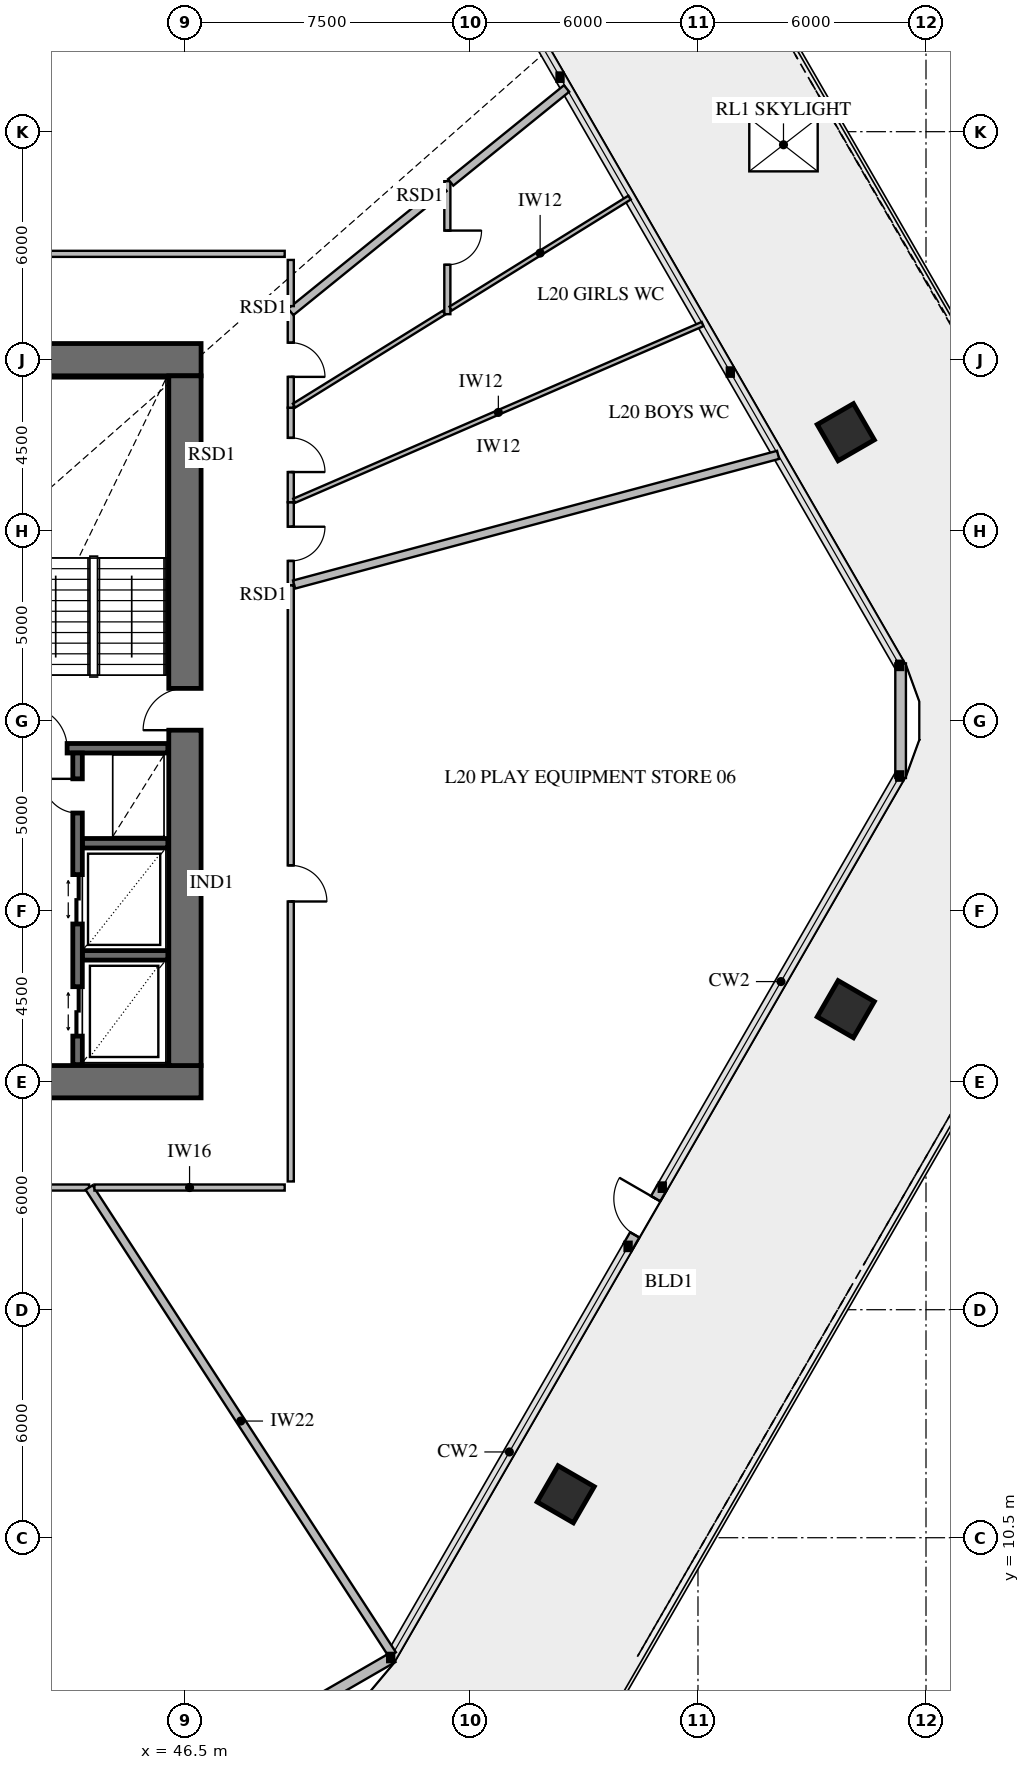
"""IFC4 building model, lengths in metres.
Left out: names, types, materials, properties, quantities, classifications, styles, units other than length and angle.
Written with IfcOpenShell. Run it as: python <this file> out.ifc"""

import sys

from ifc_helpers import new_model, si_unit, direction, frame, frame_2d, origin, origin_2d, place, context, subcontext, project, spatial, rectangle, extrude, element, fill, save


model = new_model("IFC4")
c1 = context("Model", 3, precision=1e-05, world=origin(), true_north=direction((0.0, 1.0)))
c2 = subcontext(c1, "Body", "Model", "MODEL_VIEW")
j1 = project(units=[si_unit("LENGTHUNIT", "METRE"), si_unit("PLANEANGLEUNIT", "RADIAN")], contexts=[c1])
p1 = place(None, origin())
s1 = spatial("IfcSite", under=j1, at=p1, CompositionType="ELEMENT")
p2 = place(p1, origin())
s2 = spatial("IfcBuilding", under=s1, at=p2, CompositionType="ELEMENT")
p3 = place(p2, frame((0.0, 0.0, 83.4)))
s3 = spatial("IfcBuildingStorey", under=s2, at=p3, CompositionType="ELEMENT", Elevation=83.4)
p4 = place(p3, frame((37.35, 22.5, 0.0), z_axis=(0.0, 0.0, 1.0), x_axis=(1.0, 0.0, 0.0)))
e1 = element("IfcWall", 1, at=p4, inside=s3, PredefinedType="SHEAR", context=c2, shape_type="SweptSolid", body=[
    extrude(rectangle(XDim=9.575, YDim=0.85, at=frame_2d((4.788, 0.0))), origin(), (0.0, 0.0, 1.0), 4.2),
])
p5 = place(p4, frame((3.95, 0.0, 0.0)))
e2 = element("IfcOpeningElement", 2, at=p5, cuts=e1, PredefinedType="OPENING", context=c2, shape_type="SweptSolid", body=[
    extrude(rectangle(XDim=1.5, YDim=2.15, at=frame_2d((0.75, 1.075))), frame((0.0, 0.437, 0.0), z_axis=(0.0, -1.0, 0.0), x_axis=(1.0, 0.0, 0.0)), (0.0, 0.0, 1.0), 0.874),
])
p6 = place(p3, frame((46.925, 41.5, 0.0), z_axis=(0.0, 0.0, 1.0), x_axis=(-1.0, 0.0, 0.0)))
e3 = element("IfcWall", 3, at=p6, inside=s3, PredefinedType="SHEAR", context=c2, shape_type="SweptSolid", body=[
    extrude(rectangle(XDim=7.975, YDim=0.85, at=frame_2d((3.988, 0.0))), origin(), (0.0, 0.0, 1.0), 4.2),
])
p7 = place(p3, frame((46.5, 22.925, 0.0), z_axis=(0.0, 0.0, 1.0), x_axis=(0.0, 1.0, 0.0)))
e4 = element("IfcWall", 4, at=p7, inside=s3, PredefinedType="SHEAR", context=c2, shape_type="SweptSolid", body=[
    extrude(rectangle(XDim=18.15, YDim=0.85, at=frame_2d((9.075, 0.0))), origin(), (0.0, 0.0, 1.0), 4.2),
])
p8 = place(p7, frame((8.825, 0.0, 0.0)))
e5 = element("IfcOpeningElement", 5, at=p8, cuts=e4, PredefinedType="OPENING", context=c2, shape_type="SweptSolid", body=[
    extrude(rectangle(XDim=1.1, YDim=2.15, at=frame_2d((0.55, 1.075))), frame((0.0, 0.437, 0.0), z_axis=(0.0, -1.0, 0.0), x_axis=(1.0, 0.0, 0.0)), (0.0, 0.0, 1.0), 0.874),
])
for number, where, z_axis, x_axis in (
    (6, (63.889, 39.592, 0.0), (0.0, 0.0, 1.0), (-0.5, 0.866, 0.0)),
    (7, (56.519, 11.643, 0.0), (0.0, 0.0, 1.0), (0.5, 0.866, 0.0)),
    (8, (63.889, 24.408, 0.0), (0.0, 0.0, 1.0), (0.5, 0.866, 0.0)),
):
    element("IfcColumn", number, at=place(p3, frame(where, z_axis=z_axis, x_axis=x_axis)), inside=s3, PredefinedType="COLUMN", context=c2, shape_type="SweptSolid", body=[
        extrude(rectangle(XDim=1.1, YDim=1.1, at=origin_2d()), origin(), (0.0, 0.0, 1.0), 3.85),
    ])
p9 = place(p3, frame((59.058, 19.721, 0.0), z_axis=(0.0, 0.0, 1.0), x_axis=(-0.499982180423, -0.866035691677, 0.0)))
e9 = element("IfcWall", 9, at=p9, inside=s3, PredefinedType="SOLIDWALL", context=c2, shape_type="SweptSolid", body=[
    extrude(rectangle(XDim=1.79, YDim=0.28, at=frame_2d((0.895, 0.0))), origin(), (0.0, 0.0, 1.0), 3.85),
])
p10 = place(p9, frame((0.345, 0.0, 0.0)))
e10 = element("IfcOpeningElement", 10, at=p10, cuts=e9, PredefinedType="OPENING", context=c2, shape_type="SweptSolid", body=[
    extrude(rectangle(XDim=1.1, YDim=2.2, at=frame_2d((0.55, 1.1))), frame((0.0, 0.152, 0.0), z_axis=(0.0, -1.0, 0.0), x_axis=(1.0, 0.0, 0.0)), (0.0, 0.0, 1.0), 0.304),
])
for number, where, z_axis, x_axis in (
    (11, (51.971, 7.352, 0.0), (0.0, 0.0, 1.0), (-0.866, -0.5, 0.0)),
    (12, (65.332, 33.508, 0.0), (0.0, 0.0, 1.0), (0.0, -1.0, 0.0)),
):
    element("IfcWall", number, at=place(p3, frame(where, z_axis=z_axis, x_axis=x_axis)), inside=s3, PredefinedType="SOLIDWALL", context=c2, shape_type="SweptSolid", body=[
        extrude(rectangle(XDim=3.015, YDim=0.28, at=frame_2d((1.508, 0.0))), origin(), (0.0, 0.0, 1.0), 3.85),
    ])
p11 = place(p3, frame((25.95, 31.275, 0.0), z_axis=(0.0, 0.0, 1.0), x_axis=(1.0, 0.0, 0.0)))
e13 = element("IfcWall", 13, at=p11, inside=s3, PredefinedType="SOLIDWALL", context=c2, shape_type="SweptSolid", body=[
    extrude(rectangle(XDim=20.1, YDim=0.25, at=frame_2d((10.05, 0.0))), origin(), (0.0, 0.0, 1.0), 4.2),
])
p12 = place(p11, frame((2.6, 0.0, 0.0)))
e14 = element("IfcOpeningElement", 14, at=p12, cuts=e13, PredefinedType="OPENING", context=c2, shape_type="SweptSolid", body=[
    extrude(rectangle(XDim=1.1, YDim=2.15, at=frame_2d((0.55, 1.075))), frame((0.0, 0.137, 0.0), z_axis=(0.0, -1.0, 0.0), x_axis=(1.0, 0.0, 0.0)), (0.0, 0.0, 1.0), 0.274),
])
p13 = place(p11, frame((10.6, 0.0, 0.0)))
e15 = element("IfcOpeningElement", 15, at=p13, cuts=e13, PredefinedType="OPENING", context=c2, shape_type="SweptSolid", body=[
    extrude(rectangle(XDim=1.1, YDim=2.15, at=frame_2d((0.55, 1.075))), frame((0.0, 0.137, 0.0), z_axis=(0.0, -1.0, 0.0), x_axis=(1.0, 0.0, 0.0)), (0.0, 0.0, 1.0), 0.274),
])
p14 = place(p11, frame((16.35, 0.0, 0.0)))
e16 = element("IfcOpeningElement", 16, at=p14, cuts=e13, PredefinedType="OPENING", context=c2, shape_type="SweptSolid", body=[
    extrude(rectangle(XDim=1.1, YDim=2.15, at=frame_2d((0.55, 1.075))), frame((0.0, 0.137, 0.0), z_axis=(0.0, -1.0, 0.0), x_axis=(1.0, 0.0, 0.0)), (0.0, 0.0, 1.0), 0.274),
])
for number, where, z_axis, x_axis in (
    (17, (43.8, 25.825, 0.0), (0.0, 0.0, 1.0), (1.0, 0.0, 0.0)),
    (18, (43.8, 28.775, 0.0), (0.0, 0.0, 1.0), (1.0, 0.0, 0.0)),
):
    element("IfcWall", number, at=place(p3, frame(where, z_axis=z_axis, x_axis=x_axis)), inside=s3, PredefinedType="SOLIDWALL", context=c2, shape_type="SweptSolid", body=[
        extrude(rectangle(XDim=2.25, YDim=0.25, at=frame_2d((1.125, 0.0))), origin(), (0.0, 0.0, 1.0), 4.2),
    ])
p15 = place(p3, frame((43.675, 22.95, 0.0), z_axis=(0.0, 0.0, 1.0), x_axis=(0.0, 1.0, 0.0)))
e19 = element("IfcWall", 19, at=p15, inside=s3, PredefinedType="SOLIDWALL", context=c2, shape_type="SweptSolid", body=[
    extrude(rectangle(XDim=8.2, YDim=0.25, at=frame_2d((4.1, 0.0))), origin(), (0.0, 0.0, 1.0), 4.2),
])
p16 = place(p15, frame((0.75, 0.0, 0.0)))
e20 = element("IfcOpeningElement", 20, at=p16, cuts=e19, PredefinedType="OPENING", context=c2, shape_type="SweptSolid", body=[
    extrude(rectangle(XDim=1.3, YDim=2.3, at=frame_2d((0.65, 1.15))), frame((0.0, 0.137, 0.0), z_axis=(0.0, -1.0, 0.0), x_axis=(1.0, 0.0, 0.0)), (0.0, 0.0, 1.0), 0.274),
])
p17 = place(p15, frame((3.7, 0.0, 0.0)))
e21 = element("IfcOpeningElement", 21, at=p17, cuts=e19, PredefinedType="OPENING", context=c2, shape_type="SweptSolid", body=[
    extrude(rectangle(XDim=1.3, YDim=2.3, at=frame_2d((0.65, 1.15))), frame((0.0, 0.137, 0.0), z_axis=(0.0, -1.0, 0.0), x_axis=(1.0, 0.0, 0.0)), (0.0, 0.0, 1.0), 0.274),
])
p18 = place(p15, frame((6.62, 0.0, 0.0)))
e22 = element("IfcOpeningElement", 22, at=p18, cuts=e19, PredefinedType="OPENING", context=c2, shape_type="SweptSolid", body=[
    extrude(rectangle(XDim=0.9, YDim=2.1, at=frame_2d((0.45, 1.05))), frame((0.0, 0.137, 0.0), z_axis=(0.0, -1.0, 0.0), x_axis=(1.0, 0.0, 0.0)), (0.0, 0.0, 1.0), 0.274),
])
p19 = place(p3, frame((49.285, 35.56, 0.0), z_axis=(0.0, 0.0, 1.0), x_axis=(0.0, 1.0, 0.0)))
e23 = element("IfcWall", 23, at=p19, inside=s3, PredefinedType="PARTITIONING", context=c2, shape_type="SweptSolid", body=[
    extrude(rectangle(XDim=2.189, YDim=0.16, at=frame_2d((1.094, 0.0))), origin(), (0.0, 0.0, 1.0), 3.15),
])
p20 = place(p19, frame((0.645, 0.0, 0.0)))
e24 = element("IfcOpeningElement", 24, at=p20, cuts=e23, PredefinedType="OPENING", context=c2, shape_type="SweptSolid", body=[
    extrude(rectangle(XDim=0.9, YDim=2.1, at=frame_2d((0.45, 1.05))), frame((0.0, 0.092, 0.0), z_axis=(0.0, -1.0, 0.0), x_axis=(1.0, 0.0, 0.0)), (0.0, 0.0, 1.0), 0.184),
])
p21 = place(p3, frame((49.285, 37.749, 0.0), z_axis=(0.0, 0.0, 1.0), x_axis=(0.0, 1.0, 0.0)))
e25 = element("IfcWall", 25, at=p21, inside=s3, PredefinedType="PARTITIONING", context=c2, shape_type="SweptSolid", body=[
    extrude(rectangle(XDim=2.488, YDim=0.16, at=frame_2d((1.244, 0.0))), origin(), (0.0, 0.0, 1.0), 3.85),
])
p22 = place(p21, frame((0.794, 0.0, 0.0)))
e26 = element("IfcOpeningElement", 26, at=p22, cuts=e25, PredefinedType="OPENING", context=c2, shape_type="SweptSolid", body=[
    extrude(rectangle(XDim=0.9, YDim=2.1, at=frame_2d((0.45, 1.05))), frame((0.0, 0.092, 0.0), z_axis=(0.0, -1.0, 0.0), x_axis=(1.0, 0.0, 0.0)), (0.0, 0.0, 1.0), 0.184),
])
p23 = place(p3, frame((53.405, 46.197, 0.0), z_axis=(0.0, 0.0, 1.0), x_axis=(0.0, -1.0, 0.0)))
e27 = element("IfcWall", 27, at=p23, inside=s3, PredefinedType="PARTITIONING", context=c2, shape_type="SweptSolid", body=[
    extrude(rectangle(XDim=3.5, YDim=0.16, at=frame_2d((1.75, 0.0))), origin(), (0.0, 0.0, 1.0), 3.4),
])
p24 = place(p23, frame((1.3, 0.0, 0.0)))
e28 = element("IfcOpeningElement", 28, at=p24, cuts=e27, PredefinedType="OPENING", context=c2, shape_type="SweptSolid", body=[
    extrude(rectangle(XDim=0.9, YDim=2.1, at=frame_2d((0.45, 1.05))), frame((0.0, 0.092, 0.0), z_axis=(0.0, -1.0, 0.0), x_axis=(1.0, 0.0, 0.0)), (0.0, 0.0, 1.0), 0.184),
])
p25 = place(p3, frame((49.285, 40.237, 0.0), z_axis=(0.0, 0.0, 1.0), x_axis=(0.0, 1.0, 0.0)))
e29 = element("IfcWall", 29, at=p25, inside=s3, PredefinedType="PARTITIONING", context=c2, shape_type="SweptSolid", body=[
    extrude(rectangle(XDim=2.521, YDim=0.16, at=frame_2d((1.26, 0.0))), origin(), (0.0, 0.0, 1.0), 3.85),
])
p26 = place(p25, frame((0.811, 0.0, 0.0)))
e30 = element("IfcOpeningElement", 30, at=p26, cuts=e29, PredefinedType="OPENING", context=c2, shape_type="SweptSolid", body=[
    extrude(rectangle(XDim=0.9, YDim=2.1, at=frame_2d((0.45, 1.05))), frame((0.0, 0.092, 0.0), z_axis=(0.0, -1.0, 0.0), x_axis=(1.0, 0.0, 0.0)), (0.0, 0.0, 1.0), 0.184),
])
p27 = place(p3, frame((49.125, 44.285, 0.0), z_axis=(0.0, 0.0, 1.0), x_axis=(-1.0, 0.0, 0.0)))
e31 = element("IfcWall", 31, at=p27, inside=s3, PredefinedType="PARTITIONING", context=c2, shape_type="SweptSolid", body=[
    extrude(rectangle(XDim=17.841, YDim=0.16, at=frame_2d((8.92, 0.0))), origin(), (0.0, 0.0, 1.0), 3.15),
])
p28 = place(p27, frame((8.17, 0.0, 0.0)))
e32 = element("IfcOpeningElement", 32, at=p28, cuts=e31, PredefinedType="OPENING", context=c2, shape_type="SweptSolid", body=[
    extrude(rectangle(XDim=1.5, YDim=2.15, at=frame_2d((0.75, 1.075))), frame((0.0, 0.092, 0.0), z_axis=(0.0, -1.0, 0.0), x_axis=(1.0, 0.0, 0.0)), (0.0, 0.0, 1.0), 0.184),
])
p29 = place(p3, frame((26.052, 19.715, 0.0), z_axis=(0.0, 0.0, 1.0), x_axis=(1.0, 0.0, 0.0)))
e33 = element("IfcWall", 33, at=p29, inside=s3, PredefinedType="PARTITIONING", context=c2, shape_type="SweptSolid", body=[
    extrude(rectangle(XDim=17.926, YDim=0.16, at=frame_2d((8.963, 0.0))), origin(), (0.0, 0.0, 1.0), 3.15),
])
p30 = place(p29, frame((8.488, 0.0, 0.0)))
e34 = element("IfcOpeningElement", 34, at=p30, cuts=e33, PredefinedType="OPENING", context=c2, shape_type="SweptSolid", body=[
    extrude(rectangle(XDim=0.95, YDim=2.1, at=frame_2d((0.475, 1.05))), frame((0.0, 0.092, 0.0), z_axis=(0.0, -1.0, 0.0), x_axis=(1.0, 0.0, 0.0)), (0.0, 0.0, 1.0), 0.184),
])
p31 = place(p3, frame((49.285, 19.875, 0.0), z_axis=(0.0, 0.0, 1.0), x_axis=(0.0, 1.0, 0.0)))
e35 = element("IfcWall", 35, at=p31, inside=s3, PredefinedType="PARTITIONING", context=c2, shape_type="SweptSolid", body=[
    extrude(rectangle(XDim=15.685, YDim=0.16, at=frame_2d((7.842, 0.0))), origin(), (0.0, 0.0, 1.0), 3.15),
])
p32 = place(p31, frame((7.367, 0.0, 0.0)))
e36 = element("IfcOpeningElement", 36, at=p32, cuts=e35, PredefinedType="OPENING", context=c2, shape_type="SweptSolid", body=[
    extrude(rectangle(XDim=0.95, YDim=2.1, at=frame_2d((0.475, 1.05))), frame((0.0, 0.092, 0.0), z_axis=(0.0, -1.0, 0.0), x_axis=(1.0, 0.0, 0.0)), (0.0, 0.0, 1.0), 0.184),
])
p33 = place(p3, frame((49.373, 35.583, 0.0), z_axis=(0.0, 0.0, 1.0), x_axis=(0.965927222809, 0.258813833165, 0.0)))
e37 = element("IfcWall", 37, at=p33, inside=s3, PredefinedType="PARTITIONING", context=c2, shape_type="SweptSolid", body=[
    extrude(rectangle(XDim=13.185, YDim=0.22, at=frame_2d((6.592, 0.0))), origin(), (0.0, 0.0, 1.0), 3.15),
])
p34 = place(p3, frame((49.373, 37.787, 0.0), z_axis=(0.0, 0.0, 1.0), x_axis=(0.917761357583, 0.397132333772, 0.0)))
e38 = element("IfcWall", 38, at=p34, inside=s3, PredefinedType="PARTITIONING", context=c2, shape_type="SweptSolid", body=[
    extrude(rectangle(XDim=11.711, YDim=0.12, at=frame_2d((5.855, 0.0))), origin(), (0.0, 0.0, 1.0), 3.4),
])
p35 = place(p3, frame((49.373, 40.292, 0.0), z_axis=(0.0, 0.0, 1.0), x_axis=(0.849866876435, 0.526997431054, 0.0)))
e39 = element("IfcWall", 39, at=p35, inside=s3, PredefinedType="PARTITIONING", context=c2, shape_type="SweptSolid", body=[
    extrude(rectangle(XDim=4.641, YDim=0.12, at=frame_2d((2.32, 0.0))), origin(), (0.0, 0.0, 1.0), 3.85),
])
p36 = place(p3, frame((53.493, 42.846, 0.0), z_axis=(0.0, 0.0, 1.0), x_axis=(0.849887293627, 0.526964503673, 0.0)))
e40 = element("IfcWall", 40, at=p36, inside=s3, PredefinedType="PARTITIONING", context=c2, shape_type="SweptSolid", body=[
    extrude(rectangle(XDim=5.539, YDim=0.12, at=frame_2d((2.77, 0.0))), origin(), (0.0, 0.0, 1.0), 3.4),
])
p37 = place(p3, frame((49.285, 42.758, 0.0), z_axis=(0.0, 0.0, 1.0), x_axis=(0.777159385962, 0.629303812805, 0.0)))
e41 = element("IfcWall", 41, at=p37, inside=s3, PredefinedType="PARTITIONING", context=c2, shape_type="SweptSolid", body=[
    extrude(rectangle(XDim=5.188, YDim=0.22, at=frame_2d((2.594, 0.0))), origin(), (0.0, 0.0, 1.0), 3.4),
])
p38 = place(p3, frame((53.493, 46.166, 0.0), z_axis=(0.0, 0.0, 1.0), x_axis=(0.77713476339, 0.62933421926, 0.0)))
e42 = element("IfcWall", 42, at=p38, inside=s3, PredefinedType="PARTITIONING", context=c2, shape_type="SweptSolid", body=[
    extrude(rectangle(XDim=3.925, YDim=0.22, at=frame_2d((1.962, 0.0))), origin(), (0.0, 0.0, 1.0), 3.85),
])
p39 = place(p3, frame((49.285, 42.91, 0.0), z_axis=(0.0, 0.0, 1.0), x_axis=(0.0, 1.0, 0.0)))
e43 = element("IfcWall", 43, at=p39, inside=s3, PredefinedType="PARTITIONING", context=c2, shape_type="SweptSolid", body=[
    extrude(rectangle(XDim=1.215, YDim=0.16, at=frame_2d((0.607, 0.0))), origin(), (0.0, 0.0, 1.0), 3.85),
])
p40 = place(p3, frame((43.978, 19.715, 0.0), z_axis=(0.0, 0.0, 1.0), x_axis=(0.54462522792, -0.838679534216, 0.0)))
e44 = element("IfcWall", 44, at=p40, inside=s3, PredefinedType="PARTITIONING", context=c2, shape_type="SweptSolid", body=[
    extrude(rectangle(XDim=14.654, YDim=0.22, at=frame_2d((7.327, 0.0))), origin(), (0.0, 0.0, 1.0), 3.1),
])
p41 = place(p3, frame((44.119, 19.715, 0.0), z_axis=(0.0, 0.0, 1.0), x_axis=(1.0, 0.0, 0.0)))
e45 = element("IfcWall", 45, at=p41, inside=s3, PredefinedType="PARTITIONING", context=c2, shape_type="SweptSolid", body=[
    extrude(rectangle(XDim=5.006, YDim=0.16, at=frame_2d((2.503, 0.0))), origin(), (0.0, 0.0, 1.0), 3.15),
])
p42 = place(p10, frame((1.1, 0.0, 0.0), z_axis=(0.0, 0.0, 1.0), x_axis=(-1.0, 0.0, 0.0)))
e46 = element("IfcDoor", 46, at=p42, inside=s3, OperationType="SINGLE_SWING_RIGHT", PredefinedType="DOOR", context=c2, shape_type="SweptSolid", body=[
    extrude(rectangle(XDim=1.1, YDim=2.2, at=frame_2d((0.55, 1.1))), frame((0.0, 0.025, 0.0), z_axis=(0.0, -1.0, 0.0), x_axis=(1.0, 0.0, 0.0)), (0.0, 0.0, 1.0), 0.05),
])
fill(e10, e46)
p43 = place(p3, frame((0.0, 0.0, -0.26)))
p44 = place(p43, frame((62.25, 47.156, 0.0)))
p45 = place(p44, frame((0.0, 0.0, 0.21)))
e47 = element("IfcWindow", 47, at=p45, inside=s3, PartitioningType="SINGLE_PANEL", PredefinedType="SKYLIGHT", context=c2, shape_type="SweptSolid", body=[
    extrude(rectangle(XDim=1.8, YDim=1.4, at=origin_2d()), origin(), (0.0, 0.0, 1.0), 0.05),
])
p46 = place(p8, origin())
e48 = element("IfcDoor", 48, at=p46, inside=s3, OperationType="SINGLE_SWING_LEFT", PredefinedType="USERDEFINED", context=c2, shape_type="SweptSolid", body=[
    extrude(rectangle(XDim=1.1, YDim=2.15, at=frame_2d((0.55, 1.075))), frame((0.0, 0.025, 0.0), z_axis=(0.0, -1.0, 0.0), x_axis=(1.0, 0.0, 0.0)), (0.0, 0.0, 1.0), 0.05),
])
fill(e5, e48)
p47 = place(p14, origin())
e49 = element("IfcDoor", 49, at=p47, inside=s3, OperationType="SINGLE_SWING_LEFT", PredefinedType="USERDEFINED", context=c2, shape_type="SweptSolid", body=[
    extrude(rectangle(XDim=1.1, YDim=2.15, at=frame_2d((0.55, 1.075))), frame((0.0, 0.025, 0.0), z_axis=(0.0, -1.0, 0.0), x_axis=(1.0, 0.0, 0.0)), (0.0, 0.0, 1.0), 0.05),
])
fill(e16, e49)
p48 = place(p16, origin())
e50 = element("IfcDoor", 50, at=p48, inside=s3, OperationType="DOUBLE_DOOR_SLIDING", PredefinedType="DOOR", context=c2, shape_type="SweptSolid", body=[
    extrude(rectangle(XDim=1.3, YDim=2.3, at=frame_2d((0.65, 1.15))), frame((0.0, 0.025, 0.0), z_axis=(0.0, -1.0, 0.0), x_axis=(1.0, 0.0, 0.0)), (0.0, 0.0, 1.0), 0.05),
])
fill(e20, e50)
p49 = place(p17, origin())
e51 = element("IfcDoor", 51, at=p49, inside=s3, OperationType="DOUBLE_DOOR_SLIDING", PredefinedType="DOOR", context=c2, shape_type="SweptSolid", body=[
    extrude(rectangle(XDim=1.3, YDim=2.3, at=frame_2d((0.65, 1.15))), frame((0.0, 0.025, 0.0), z_axis=(0.0, -1.0, 0.0), x_axis=(1.0, 0.0, 0.0)), (0.0, 0.0, 1.0), 0.05),
])
fill(e21, e51)
p50 = place(p18, origin())
e52 = element("IfcDoor", 52, at=p50, inside=s3, OperationType="SINGLE_SWING_RIGHT", PredefinedType="DOOR", context=c2, shape_type="SweptSolid", body=[
    extrude(rectangle(XDim=0.9, YDim=2.1, at=frame_2d((0.45, 1.05))), frame((0.0, 0.025, 0.0), z_axis=(0.0, -1.0, 0.0), x_axis=(1.0, 0.0, 0.0)), (0.0, 0.0, 1.0), 0.05),
])
fill(e22, e52)
p51 = place(p20, frame((0.9, 0.0, 0.0), z_axis=(0.0, 0.0, 1.0), x_axis=(-1.0, 0.0, 0.0)))
e53 = element("IfcDoor", 53, at=p51, inside=s3, OperationType="SINGLE_SWING_LEFT", PredefinedType="DOOR", context=c2, shape_type="SweptSolid", body=[
    extrude(rectangle(XDim=0.9, YDim=2.1, at=frame_2d((0.45, 1.05))), frame((0.0, 0.025, 0.0), z_axis=(0.0, -1.0, 0.0), x_axis=(1.0, 0.0, 0.0)), (0.0, 0.0, 1.0), 0.05),
])
fill(e24, e53)
p52 = place(p22, frame((0.9, 0.0, 0.0), z_axis=(0.0, 0.0, 1.0), x_axis=(-1.0, 0.0, 0.0)))
e54 = element("IfcDoor", 54, at=p52, inside=s3, OperationType="SINGLE_SWING_RIGHT", PredefinedType="DOOR", context=c2, shape_type="SweptSolid", body=[
    extrude(rectangle(XDim=0.9, YDim=2.1, at=frame_2d((0.45, 1.05))), frame((0.0, 0.025, 0.0), z_axis=(0.0, -1.0, 0.0), x_axis=(1.0, 0.0, 0.0)), (0.0, 0.0, 1.0), 0.05),
])
fill(e26, e54)
p53 = place(p24, origin())
e55 = element("IfcDoor", 55, at=p53, inside=s3, OperationType="SINGLE_SWING_LEFT", PredefinedType="DOOR", context=c2, shape_type="SweptSolid", body=[
    extrude(rectangle(XDim=0.9, YDim=2.1, at=frame_2d((0.45, 1.05))), frame((0.0, 0.025, 0.0), z_axis=(0.0, -1.0, 0.0), x_axis=(1.0, 0.0, 0.0)), (0.0, 0.0, 1.0), 0.05),
])
fill(e28, e55)
p54 = place(p26, frame((0.9, 0.0, 0.0), z_axis=(0.0, 0.0, 1.0), x_axis=(-1.0, 0.0, 0.0)))
e56 = element("IfcDoor", 56, at=p54, inside=s3, OperationType="SINGLE_SWING_RIGHT", PredefinedType="DOOR", context=c2, shape_type="SweptSolid", body=[
    extrude(rectangle(XDim=0.9, YDim=2.1, at=frame_2d((0.45, 1.05))), frame((0.0, 0.025, 0.0), z_axis=(0.0, -1.0, 0.0), x_axis=(1.0, 0.0, 0.0)), (0.0, 0.0, 1.0), 0.05),
])
fill(e30, e56)
p55 = place(p32, frame((0.95, 0.0, 0.0), z_axis=(0.0, 0.0, 1.0), x_axis=(-1.0, 0.0, 0.0)))
e57 = element("IfcDoor", 57, at=p55, inside=s3, OperationType="SINGLE_SWING_RIGHT", PredefinedType="DOOR", context=c2, shape_type="SweptSolid", body=[
    extrude(rectangle(XDim=0.95, YDim=2.1, at=frame_2d((0.475, 1.05))), frame((0.0, 0.025, 0.0), z_axis=(0.0, -1.0, 0.0), x_axis=(1.0, 0.0, 0.0)), (0.0, 0.0, 1.0), 0.05),
])
fill(e36, e57)
save(model, sys.argv[1])
